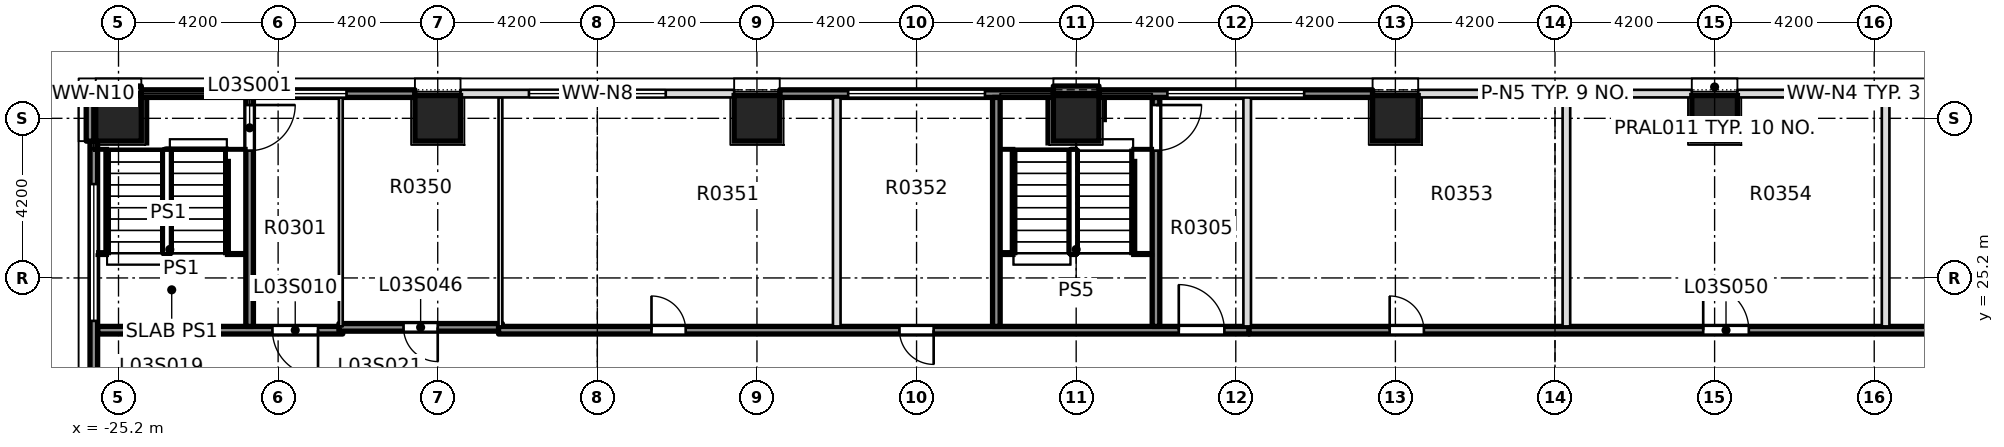
"""IFC4 building model, lengths in metres.
Left out: names, types, materials, properties, quantities, classifications, styles, units other than length and angle.
Written with IfcOpenShell. Run it as: python <this file> out.ifc"""

import sys

from ifc_helpers import new_model, si_unit, direction, frame, frame_2d, origin, origin_2d, place, context, subcontext, project, spatial, rectangle, extrude, element, fill, save


model = new_model("IFC4")
c1 = context("Model", 3, precision=1e-05, world=origin(), true_north=direction((0.0, 1.0)))
c2 = subcontext(c1, "Body", "Model", "MODEL_VIEW")
j1 = project(units=[si_unit("LENGTHUNIT", "METRE"), si_unit("PLANEANGLEUNIT", "RADIAN")], contexts=[c1])
p1 = place(None, origin())
s1 = spatial("IfcSite", under=j1, at=p1, CompositionType="ELEMENT")
p2 = place(p1, origin())
s2 = spatial("IfcBuilding", under=s1, at=p2, CompositionType="ELEMENT")
p3 = place(p2, frame((0.0, 0.0, 20.0)))
s3 = spatial("IfcBuildingStorey", under=s2, at=p3, CompositionType="ELEMENT", Elevation=20.0)
for number, where, z_axis, x_axis in (
    (1, (-25.2, 29.4, 0.0), (0.0, 0.0, 1.0), (1.0, 0.0, 0.0)),
    (2, (-16.8, 29.4, 0.0), (0.0, 0.0, 1.0), (1.0, 0.0, 0.0)),
    (3, (-8.4, 29.4, 0.0), (0.0, 0.0, 1.0), (1.0, 0.0, 0.0)),
    (4, (0.0, 29.4, 0.0), (0.0, 0.0, 1.0), (1.0, 0.0, 0.0)),
    (5, (8.4, 29.4, 0.0), (0.0, 0.0, 1.0), (1.0, 0.0, 0.0)),
    (6, (16.8, 29.4, 0.0), (0.0, 0.0, 1.0), (1.0, 0.0, 0.0)),
):
    element("IfcColumn", number, at=place(p3, frame(where, z_axis=z_axis, x_axis=x_axis)), inside=s3, PredefinedType="COLUMN", context=c2, shape_type="SweptSolid", body=[
        extrude(rectangle(XDim=1.2, YDim=1.2, at=origin_2d()), origin(), (0.0, 0.0, 1.0), 5.0),
    ])
p4 = place(p3, frame((-25.75, 23.825, 0.0), z_axis=(0.0, 0.0, 1.0), x_axis=(1.0, 0.0, 0.0)))
e7 = element("IfcWall", 7, at=p4, inside=s3, PredefinedType="SOLIDWALL", context=c2, shape_type="SweptSolid", body=[
    extrude(rectangle(XDim=6.45, YDim=0.2, at=frame_2d((3.225, 0.0))), origin(), (0.0, 0.0, 1.0), 4.6),
])
p5 = place(p4, frame((4.6, 0.0, 0.0)))
e8 = element("IfcOpeningElement", 8, at=p5, cuts=e7, PredefinedType="OPENING", context=c2, shape_type="SweptSolid", body=[
    extrude(rectangle(XDim=1.2, YDim=2.1, at=frame_2d((0.6, 1.05))), frame((0.0, 0.11, 0.0), z_axis=(0.0, -1.0, 0.0), x_axis=(1.0, 0.0, 0.0)), (0.0, 0.0, 1.0), 0.22),
])
p6 = place(p3, frame((-19.4, 23.9, 0.0), z_axis=(0.0, 0.0, 1.0), x_axis=(1.0, 0.0, 0.0)))
e9 = element("IfcWall", 9, at=p6, inside=s3, PredefinedType="SOLIDWALL", context=c2, shape_type="SweptSolid", body=[
    extrude(rectangle(XDim=4.3, YDim=0.2, at=frame_2d((2.15, 0.0))), origin(), (0.0, 0.0, 1.0), 4.6),
])
p7 = place(p6, frame((1.7, 0.0, 0.0)))
e10 = element("IfcOpeningElement", 10, at=p7, cuts=e9, PredefinedType="OPENING", context=c2, shape_type="SweptSolid", body=[
    extrude(rectangle(XDim=0.9, YDim=2.1, at=frame_2d((0.45, 1.05))), frame((0.0, 0.11, 0.0), z_axis=(0.0, -1.0, 0.0), x_axis=(1.0, 0.0, 0.0)), (0.0, 0.0, 1.0), 0.22),
])
p8 = place(p3, frame((-15.2, 23.825, 0.0), z_axis=(0.0, 0.0, 1.0), x_axis=(1.0, 0.0, 0.0)))
e11 = element("IfcWall", 11, at=p8, inside=s3, PredefinedType="SOLIDWALL", context=c2, shape_type="SweptSolid", body=[
    extrude(rectangle(XDim=19.75, YDim=0.2, at=frame_2d((9.875, 0.0))), origin(), (0.0, 0.0, 1.0), 4.6),
])
p9 = place(p8, frame((17.9, 0.0, 0.0)))
e12 = element("IfcOpeningElement", 12, at=p9, cuts=e11, PredefinedType="OPENING", context=c2, shape_type="SweptSolid", body=[
    extrude(rectangle(XDim=1.2, YDim=2.1, at=frame_2d((0.6, 1.05))), frame((0.0, 0.11, 0.0), z_axis=(0.0, -1.0, 0.0), x_axis=(1.0, 0.0, 0.0)), (0.0, 0.0, 1.0), 0.22),
])
p10 = place(p8, frame((4.025, 0.0, 0.0)))
e13 = element("IfcOpeningElement", 13, at=p10, cuts=e11, PredefinedType="OPENING", context=c2, shape_type="SweptSolid", body=[
    extrude(rectangle(XDim=0.9, YDim=2.1, at=frame_2d((0.45, 1.05))), frame((0.0, 0.11, 0.0), z_axis=(0.0, -1.0, 0.0), x_axis=(1.0, 0.0, 0.0)), (0.0, 0.0, 1.0), 0.22),
])
p11 = place(p8, frame((10.55, 0.0, 0.0)))
e14 = element("IfcOpeningElement", 14, at=p11, cuts=e11, PredefinedType="OPENING", context=c2, shape_type="SweptSolid", body=[
    extrude(rectangle(XDim=0.9, YDim=2.1, at=frame_2d((0.45, 1.05))), frame((0.0, 0.11, 0.0), z_axis=(0.0, -1.0, 0.0), x_axis=(1.0, 0.0, 0.0)), (0.0, 0.0, 1.0), 0.22),
])
p12 = place(p3, frame((-21.75, 23.925, 0.0), z_axis=(0.0, 0.0, 1.0), x_axis=(0.0, 1.0, 0.0)))
e15 = element("IfcWall", 15, at=p12, inside=s3, PredefinedType="SOLIDWALL", context=c2, shape_type="SweptSolid", body=[
    extrude(rectangle(XDim=6.025, YDim=0.2, at=frame_2d((3.012, 0.0))), origin(), (0.0, 0.0, 1.0), 4.6),
])
p13 = place(p12, frame((4.625, 0.0, 0.0)))
e16 = element("IfcOpeningElement", 16, at=p13, cuts=e15, PredefinedType="OPENING", context=c2, shape_type="SweptSolid", body=[
    extrude(rectangle(XDim=1.2, YDim=2.1, at=frame_2d((0.6, 1.05))), frame((0.0, 0.11, 0.0), z_axis=(0.0, -1.0, 0.0), x_axis=(1.0, 0.0, 0.0)), (0.0, 0.0, 1.0), 0.22),
])
for number, where, z_axis, x_axis in (
    (17, (-19.35, 23.925, 0.0), (0.0, 0.0, 1.0), (0.0, 1.0, 0.0)),
    (18, (-15.15, 23.925, 0.0), (0.0, 0.0, 1.0), (0.0, 1.0, 0.0)),
):
    element("IfcWall", number, at=place(p3, frame(where, z_axis=z_axis, x_axis=x_axis)), inside=s3, PredefinedType="PARTITIONING", context=c2, shape_type="SweptSolid", body=[
        extrude(rectangle(XDim=6.025, YDim=0.1, at=frame_2d((3.012, 0.0))), origin(), (0.0, 0.0, 1.0), 4.6),
    ])
p14 = place(p3, frame((-6.3, 23.925, 0.0), z_axis=(0.0, 0.0, 1.0), x_axis=(0.0, 1.0, 0.0)))
e19 = element("IfcWall", 19, at=p14, inside=s3, PredefinedType="PARTITIONING", context=c2, shape_type="SweptSolid", body=[
    extrude(rectangle(XDim=6.025, YDim=0.2, at=frame_2d((3.012, 0.0))), origin(), (0.0, 0.0, 1.0), 4.6),
])
p15 = place(p3, frame((2.1, 23.925, 0.0), z_axis=(0.0, 0.0, 1.0), x_axis=(0.0, 1.0, 0.0)))
e20 = element("IfcWall", 20, at=p15, inside=s3, PredefinedType="SOLIDWALL", context=c2, shape_type="SweptSolid", body=[
    extrude(rectangle(XDim=6.025, YDim=0.2, at=frame_2d((3.012, 0.0))), origin(), (0.0, 0.0, 1.0), 4.6),
])
p16 = place(p15, frame((4.625, 0.0, 0.0)))
e21 = element("IfcOpeningElement", 21, at=p16, cuts=e20, PredefinedType="OPENING", context=c2, shape_type="SweptSolid", body=[
    extrude(rectangle(XDim=1.2, YDim=2.1, at=frame_2d((0.6, 1.05))), frame((0.0, 0.11, 0.0), z_axis=(0.0, -1.0, 0.0), x_axis=(1.0, 0.0, 0.0)), (0.0, 0.0, 1.0), 0.22),
])
for number, where, z_axis, x_axis in (
    (22, (4.5, 23.925, 0.0), (0.0, 0.0, 1.0), (0.0, 1.0, 0.0)),
    (23, (12.9, 23.925, 0.0), (0.0, 0.0, 1.0), (0.0, 1.0, 0.0)),
    (24, (21.3, 23.925, 0.0), (0.0, 0.0, 1.0), (0.0, 1.0, 0.0)),
):
    element("IfcWall", number, at=place(p3, frame(where, z_axis=z_axis, x_axis=x_axis)), inside=s3, PredefinedType="PARTITIONING", context=c2, shape_type="SweptSolid", body=[
        extrude(rectangle(XDim=6.025, YDim=0.2, at=frame_2d((3.012, 0.0))), origin(), (0.0, 0.0, 1.0), 4.6),
    ])
p17 = place(p3, frame((24.6, 30.05, 0.0), z_axis=(0.0, 0.0, 1.0), x_axis=(-1.0, 0.0, 0.0)))
e25 = element("IfcWall", 25, at=p17, inside=s3, PredefinedType="STANDARD", context=c2, shape_type="SweptSolid", body=[
    extrude(rectangle(XDim=7.2, YDim=0.2, at=frame_2d((3.6, 0.0))), origin(), (0.0, 0.0, 1.0), 4.6),
])
p18 = place(p17, frame((1.8, 0.0, 0.9)))
e26 = element("IfcOpeningElement", 26, at=p18, cuts=e25, PredefinedType="OPENING", context=c2, shape_type="SweptSolid", body=[
    extrude(rectangle(XDim=3.6, YDim=2.8, at=frame_2d((1.8, 1.4))), frame((0.0, 0.11, 0.0), z_axis=(0.0, -1.0, 0.0), x_axis=(1.0, 0.0, 0.0)), (0.0, 0.0, 1.0), 0.22),
])
p19 = place(p3, frame((16.2, 30.05, 0.0), z_axis=(0.0, 0.0, 1.0), x_axis=(-1.0, 0.0, 0.0)))
e27 = element("IfcWall", 27, at=p19, inside=s3, PredefinedType="STANDARD", context=c2, shape_type="SweptSolid", body=[
    extrude(rectangle(XDim=7.2, YDim=0.2, at=frame_2d((3.6, 0.0))), origin(), (0.0, 0.0, 1.0), 4.6),
])
p20 = place(p19, frame((1.8, 0.0, 0.9)))
e28 = element("IfcOpeningElement", 28, at=p20, cuts=e27, PredefinedType="OPENING", context=c2, shape_type="SweptSolid", body=[
    extrude(rectangle(XDim=3.6, YDim=2.8, at=frame_2d((1.8, 1.4))), frame((0.0, 0.11, 0.0), z_axis=(0.0, -1.0, 0.0), x_axis=(1.0, 0.0, 0.0)), (0.0, 0.0, 1.0), 0.22),
])
p21 = place(p3, frame((0.6, 30.05, 0.0), z_axis=(0.0, 0.0, 1.0), x_axis=(1.0, 0.0, 0.0)))
e29 = element("IfcWall", 29, at=p21, inside=s3, PredefinedType="SOLIDWALL", context=c2, shape_type="SweptSolid", body=[
    extrude(rectangle(XDim=7.2, YDim=0.2, at=frame_2d((3.6, 0.0))), origin(), (0.0, 0.0, 1.0), 4.6),
])
p22 = place(p21, frame((1.8, 0.0, 0.9)))
e30 = element("IfcOpeningElement", 30, at=p22, cuts=e29, PredefinedType="OPENING", context=c2, shape_type="SweptSolid", body=[
    extrude(rectangle(XDim=3.6, YDim=2.8, at=frame_2d((1.8, 1.4))), frame((0.0, 0.11, 0.0), z_axis=(0.0, -1.0, 0.0), x_axis=(1.0, 0.0, 0.0)), (0.0, 0.0, 1.0), 0.22),
])
p23 = place(p3, frame((-7.8, 30.05, 0.0), z_axis=(0.0, 0.0, 1.0), x_axis=(1.0, 0.0, 0.0)))
e31 = element("IfcWall", 31, at=p23, inside=s3, PredefinedType="SOLIDWALL", context=c2, shape_type="SweptSolid", body=[
    extrude(rectangle(XDim=7.2, YDim=0.2, at=frame_2d((3.6, 0.0))), origin(), (0.0, 0.0, 1.0), 4.6),
])
p24 = place(p23, frame((1.8, 0.0, 0.9)))
e32 = element("IfcOpeningElement", 32, at=p24, cuts=e31, PredefinedType="OPENING", context=c2, shape_type="SweptSolid", body=[
    extrude(rectangle(XDim=3.6, YDim=2.8, at=frame_2d((1.8, 1.4))), frame((0.0, 0.11, 0.0), z_axis=(0.0, -1.0, 0.0), x_axis=(1.0, 0.0, 0.0)), (0.0, 0.0, 1.0), 0.22),
])
p25 = place(p3, frame((-9.0, 30.05, 0.0), z_axis=(0.0, 0.0, 1.0), x_axis=(-1.0, 0.0, 0.0)))
e33 = element("IfcWall", 33, at=p25, inside=s3, PredefinedType="STANDARD", context=c2, shape_type="SweptSolid", body=[
    extrude(rectangle(XDim=7.2, YDim=0.2, at=frame_2d((3.6, 0.0))), origin(), (0.0, 0.0, 1.0), 4.6),
])
p26 = place(p25, frame((1.8, 0.0, 0.9)))
e34 = element("IfcOpeningElement", 34, at=p26, cuts=e33, PredefinedType="OPENING", context=c2, shape_type="SweptSolid", body=[
    extrude(rectangle(XDim=3.6, YDim=2.8, at=frame_2d((1.8, 1.4))), frame((0.0, 0.11, 0.0), z_axis=(0.0, -1.0, 0.0), x_axis=(1.0, 0.0, 0.0)), (0.0, 0.0, 1.0), 0.22),
])
p27 = place(p3, frame((-24.6, 30.05, 0.0), z_axis=(0.0, 0.0, 1.0), x_axis=(1.0, 0.0, 0.0)))
e35 = element("IfcWall", 35, at=p27, inside=s3, PredefinedType="SOLIDWALL", context=c2, shape_type="SweptSolid", body=[
    extrude(rectangle(XDim=7.2, YDim=0.2, at=frame_2d((3.6, 0.0))), origin(), (0.0, 0.0, 1.0), 4.6),
])
p28 = place(p27, frame((1.8, 0.0, 0.9)))
e36 = element("IfcOpeningElement", 36, at=p28, cuts=e35, PredefinedType="OPENING", context=c2, shape_type="SweptSolid", body=[
    extrude(rectangle(XDim=3.6, YDim=2.8, at=frame_2d((1.8, 1.4))), frame((0.0, 0.11, 0.0), z_axis=(0.0, -1.0, 0.0), x_axis=(1.0, 0.0, 0.0)), (0.0, 0.0, 1.0), 0.22),
])
p29 = place(p3, frame((-25.8, 30.05, 0.0), z_axis=(0.0, 0.0, 1.0), x_axis=(-1.0, 0.0, 0.0)))
e37 = element("IfcWall", 37, at=p29, inside=s3, PredefinedType="STANDARD", context=c2, shape_type="SweptSolid", body=[
    extrude(rectangle(XDim=0.15, YDim=0.2, at=frame_2d((0.075, 0.0))), origin(), (0.0, 0.0, 1.0), 4.6),
])
p30 = place(p3, frame((-25.85, 21.6, 0.0), z_axis=(0.0, 0.0, 1.0), x_axis=(0.0, 1.0, 0.0)))
e38 = element("IfcWall", 38, at=p30, inside=s3, PredefinedType="SOLIDWALL", context=c2, shape_type="SweptSolid", body=[
    extrude(rectangle(XDim=7.2, YDim=0.2, at=frame_2d((3.6, 0.0))), origin(), (0.0, 0.0, 1.0), 4.6),
])
p31 = place(p30, frame((2.47, 0.0, 0.9)))
e39 = element("IfcOpeningElement", 39, at=p31, cuts=e38, PredefinedType="OPENING", context=c2, shape_type="SweptSolid", body=[
    extrude(rectangle(XDim=3.6, YDim=2.8, at=frame_2d((1.8, 1.4))), frame((0.0, 0.11, 0.0), z_axis=(0.0, -1.0, 0.0), x_axis=(1.0, 0.0, 0.0)), (0.0, 0.0, 1.0), 0.22),
])
p32 = place(p3, frame((-25.95, 28.8, 0.0), z_axis=(0.0, 0.0, 1.0), x_axis=(0.0, 1.0, 0.0)))
e40 = element("IfcWall", 40, at=p32, inside=s3, PredefinedType="SOLIDWALL", context=c2, shape_type="SweptSolid", body=[
    extrude(rectangle(XDim=1.1, YDim=0.2, at=frame_2d((0.55, 0.0))), origin(), (0.0, 0.0, 1.0), 4.6),
])
p33 = place(p3, frame((-25.8, 30.15, 0.0), z_axis=(0.0, 0.0, 1.0), x_axis=(1.0, 0.0, 0.0)))
e41 = element("IfcWall", 41, at=p33, inside=s3, PredefinedType="SOLIDWALL", context=c2, shape_type="SweptSolid", body=[
    extrude(rectangle(XDim=1.2, YDim=0.2, at=frame_2d((0.6, 0.0))), origin(), (0.0, 0.0, 1.0), 4.6),
])
p34 = place(p3, frame((-0.6, 30.15, 0.0), z_axis=(0.0, 0.0, 1.0), x_axis=(1.0, 0.0, 0.0)))
e42 = element("IfcWall", 42, at=p34, inside=s3, PredefinedType="SOLIDWALL", context=c2, shape_type="SweptSolid", body=[
    extrude(rectangle(XDim=1.2, YDim=0.2, at=frame_2d((0.6, 0.0))), origin(), (0.0, 0.0, 1.0), 4.6),
])
p35 = place(p3, frame((-2.1, 23.925, 0.0), z_axis=(0.0, 0.0, 1.0), x_axis=(0.0, 1.0, 0.0)))
e43 = element("IfcWall", 43, at=p35, inside=s3, PredefinedType="SOLIDWALL", context=c2, shape_type="SweptSolid", body=[
    extrude(rectangle(XDim=6.025, YDim=0.2, at=frame_2d((3.012, 0.0))), origin(), (0.0, 0.0, 1.0), 4.6),
])
p36 = place(p3, frame((4.55, 23.825, 0.0), z_axis=(0.0, 0.0, 1.0), x_axis=(1.0, 0.0, 0.0)))
e44 = element("IfcWall", 44, at=p36, inside=s3, PredefinedType="SOLIDWALL", context=c2, shape_type="SweptSolid", body=[
    extrude(rectangle(XDim=31.7, YDim=0.2, at=frame_2d((15.85, 0.0))), origin(), (0.0, 0.0, 1.0), 4.6),
])
p37 = place(p36, frame((3.7, 0.0, 0.0)))
e45 = element("IfcOpeningElement", 45, at=p37, cuts=e44, PredefinedType="OPENING", context=c2, shape_type="SweptSolid", body=[
    extrude(rectangle(XDim=0.9, YDim=2.1, at=frame_2d((0.45, 1.05))), frame((0.0, 0.11, 0.0), z_axis=(0.0, -1.0, 0.0), x_axis=(1.0, 0.0, 0.0)), (0.0, 0.0, 1.0), 0.22),
])
p38 = place(p36, frame((11.95, 0.0, 0.0)))
e46 = element("IfcOpeningElement", 46, at=p38, cuts=e44, PredefinedType="OPENING", context=c2, shape_type="SweptSolid", body=[
    extrude(rectangle(XDim=1.2, YDim=2.1, at=frame_2d((0.6, 1.05))), frame((0.0, 0.11, 0.0), z_axis=(0.0, -1.0, 0.0), x_axis=(1.0, 0.0, 0.0)), (0.0, 0.0, 1.0), 0.22),
])
p39 = place(p36, frame((23.725, 0.0, 0.0)))
e47 = element("IfcOpeningElement", 47, at=p39, cuts=e44, PredefinedType="OPENING", context=c2, shape_type="SweptSolid", body=[
    extrude(rectangle(XDim=0.9, YDim=2.1, at=frame_2d((0.45, 1.05))), frame((0.0, 0.11, 0.0), z_axis=(0.0, -1.0, 0.0), x_axis=(1.0, 0.0, 0.0)), (0.0, 0.0, 1.0), 0.22),
])
p40 = place(p13, origin())
e48 = element("IfcDoor", 48, at=p40, inside=s3, OperationType="DOUBLE_DOOR_SINGLE_SWING", PredefinedType="DOOR", context=c2, shape_type="SweptSolid", body=[
    extrude(rectangle(XDim=1.2, YDim=2.1, at=frame_2d((0.6, 1.05))), frame((0.0, 0.025, 0.0), z_axis=(0.0, -1.0, 0.0), x_axis=(1.0, 0.0, 0.0)), (0.0, 0.0, 1.0), 0.05),
])
fill(e16, e48)
p41 = place(p16, origin())
e49 = element("IfcDoor", 49, at=p41, inside=s3, OperationType="DOUBLE_DOOR_SINGLE_SWING", PredefinedType="DOOR", context=c2, shape_type="SweptSolid", body=[
    extrude(rectangle(XDim=1.2, YDim=2.1, at=frame_2d((0.6, 1.05))), frame((0.0, 0.025, 0.0), z_axis=(0.0, -1.0, 0.0), x_axis=(1.0, 0.0, 0.0)), (0.0, 0.0, 1.0), 0.05),
])
fill(e21, e49)
p42 = place(p5, origin())
e50 = element("IfcDoor", 50, at=p42, inside=s3, OperationType="SINGLE_SWING_LEFT", PredefinedType="DOOR", context=c2, shape_type="SweptSolid", body=[
    extrude(rectangle(XDim=1.2, YDim=2.1, at=frame_2d((0.6, 1.05))), frame((0.0, 0.025, 0.0), z_axis=(0.0, -1.0, 0.0), x_axis=(1.0, 0.0, 0.0)), (0.0, 0.0, 1.0), 0.05),
])
fill(e8, e50)
p43 = place(p9, origin())
e51 = element("IfcDoor", 51, at=p43, inside=s3, OperationType="SINGLE_SWING_RIGHT", PredefinedType="DOOR", context=c2, shape_type="SweptSolid", body=[
    extrude(rectangle(XDim=1.2, YDim=2.1, at=frame_2d((0.6, 1.05))), frame((0.0, 0.025, 0.0), z_axis=(0.0, -1.0, 0.0), x_axis=(1.0, 0.0, 0.0)), (0.0, 0.0, 1.0), 0.05),
])
fill(e12, e51)
p44 = place(p7, origin())
e52 = element("IfcDoor", 52, at=p44, inside=s3, OperationType="SINGLE_SWING_RIGHT", PredefinedType="DOOR", context=c2, shape_type="SweptSolid", body=[
    extrude(rectangle(XDim=0.9, YDim=2.1, at=frame_2d((0.45, 1.05))), frame((0.0, 0.025, 0.0), z_axis=(0.0, -1.0, 0.0), x_axis=(1.0, 0.0, 0.0)), (0.0, 0.0, 1.0), 0.05),
])
fill(e10, e52)
p45 = place(p10, origin())
e53 = element("IfcDoor", 53, at=p45, inside=s3, OperationType="SINGLE_SWING_LEFT", PredefinedType="DOOR", context=c2, shape_type="SweptSolid", body=[
    extrude(rectangle(XDim=0.9, YDim=2.1, at=frame_2d((0.45, 1.05))), frame((0.0, 0.025, 0.0), z_axis=(0.0, -1.0, 0.0), x_axis=(1.0, 0.0, 0.0)), (0.0, 0.0, 1.0), 0.05),
])
fill(e13, e53)
p46 = place(p11, origin())
e54 = element("IfcDoor", 54, at=p46, inside=s3, OperationType="SINGLE_SWING_RIGHT", PredefinedType="DOOR", context=c2, shape_type="SweptSolid", body=[
    extrude(rectangle(XDim=0.9, YDim=2.1, at=frame_2d((0.45, 1.05))), frame((0.0, 0.025, 0.0), z_axis=(0.0, -1.0, 0.0), x_axis=(1.0, 0.0, 0.0)), (0.0, 0.0, 1.0), 0.05),
])
fill(e14, e54)
p47 = place(p37, origin())
e55 = element("IfcDoor", 55, at=p47, inside=s3, OperationType="SINGLE_SWING_RIGHT", PredefinedType="DOOR", context=c2, shape_type="SweptSolid", body=[
    extrude(rectangle(XDim=0.9, YDim=2.1, at=frame_2d((0.45, 1.05))), frame((0.0, 0.025, 0.0), z_axis=(0.0, -1.0, 0.0), x_axis=(1.0, 0.0, 0.0)), (0.0, 0.0, 1.0), 0.05),
])
fill(e45, e55)
p48 = place(p38, origin())
e56 = element("IfcDoor", 56, at=p48, inside=s3, OperationType="SINGLE_SWING_RIGHT", PredefinedType="DOOR", context=c2, shape_type="SweptSolid", body=[
    extrude(rectangle(XDim=1.2, YDim=2.1, at=frame_2d((0.6, 1.05))), frame((0.0, 0.025, 0.0), z_axis=(0.0, -1.0, 0.0), x_axis=(1.0, 0.0, 0.0)), (0.0, 0.0, 1.0), 0.05),
])
fill(e46, e56)
p49 = place(p18, origin())
e57 = element("IfcWindow", 57, at=p49, inside=s3, PartitioningType="SINGLE_PANEL", PredefinedType="WINDOW", context=c2, shape_type="SweptSolid", body=[
    extrude(rectangle(XDim=3.6, YDim=2.8, at=frame_2d((1.8, 1.4))), frame((0.0, 0.03, 0.0), z_axis=(0.0, -1.0, 0.0), x_axis=(1.0, 0.0, 0.0)), (0.0, 0.0, 1.0), 0.06),
])
fill(e26, e57)
p50 = place(p20, origin())
e58 = element("IfcWindow", 58, at=p50, inside=s3, PartitioningType="SINGLE_PANEL", PredefinedType="WINDOW", context=c2, shape_type="SweptSolid", body=[
    extrude(rectangle(XDim=3.6, YDim=2.8, at=frame_2d((1.8, 1.4))), frame((0.0, 0.03, 0.0), z_axis=(0.0, -1.0, 0.0), x_axis=(1.0, 0.0, 0.0)), (0.0, 0.0, 1.0), 0.06),
])
fill(e28, e58)
p51 = place(p22, origin())
e59 = element("IfcWindow", 59, at=p51, inside=s3, PartitioningType="SINGLE_PANEL", PredefinedType="WINDOW", context=c2, shape_type="SweptSolid", body=[
    extrude(rectangle(XDim=3.6, YDim=2.8, at=frame_2d((1.8, 1.4))), frame((0.0, 0.03, 0.0), z_axis=(0.0, -1.0, 0.0), x_axis=(1.0, 0.0, 0.0)), (0.0, 0.0, 1.0), 0.06),
])
fill(e30, e59)
p52 = place(p24, origin())
e60 = element("IfcWindow", 60, at=p52, inside=s3, PartitioningType="SINGLE_PANEL", PredefinedType="WINDOW", context=c2, shape_type="SweptSolid", body=[
    extrude(rectangle(XDim=3.6, YDim=2.8, at=frame_2d((1.8, 1.4))), frame((0.0, 0.03, 0.0), z_axis=(0.0, -1.0, 0.0), x_axis=(1.0, 0.0, 0.0)), (0.0, 0.0, 1.0), 0.06),
])
fill(e32, e60)
p53 = place(p26, origin())
e61 = element("IfcWindow", 61, at=p53, inside=s3, PartitioningType="SINGLE_PANEL", PredefinedType="WINDOW", context=c2, shape_type="SweptSolid", body=[
    extrude(rectangle(XDim=3.6, YDim=2.8, at=frame_2d((1.8, 1.4))), frame((0.0, 0.03, 0.0), z_axis=(0.0, -1.0, 0.0), x_axis=(1.0, 0.0, 0.0)), (0.0, 0.0, 1.0), 0.06),
])
fill(e34, e61)
p54 = place(p28, origin())
e62 = element("IfcWindow", 62, at=p54, inside=s3, PartitioningType="SINGLE_PANEL", PredefinedType="WINDOW", context=c2, shape_type="SweptSolid", body=[
    extrude(rectangle(XDim=3.6, YDim=2.8, at=frame_2d((1.8, 1.4))), frame((0.0, 0.03, 0.0), z_axis=(0.0, -1.0, 0.0), x_axis=(1.0, 0.0, 0.0)), (0.0, 0.0, 1.0), 0.06),
])
fill(e36, e62)
p55 = place(p31, origin())
e63 = element("IfcWindow", 63, at=p55, inside=s3, PartitioningType="SINGLE_PANEL", PredefinedType="WINDOW", context=c2, shape_type="SweptSolid", body=[
    extrude(rectangle(XDim=3.6, YDim=2.8, at=frame_2d((1.8, 1.4))), frame((0.0, 0.03, 0.0), z_axis=(0.0, -1.0, 0.0), x_axis=(1.0, 0.0, 0.0)), (0.0, 0.0, 1.0), 0.06),
])
fill(e39, e63)
save(model, sys.argv[1])
